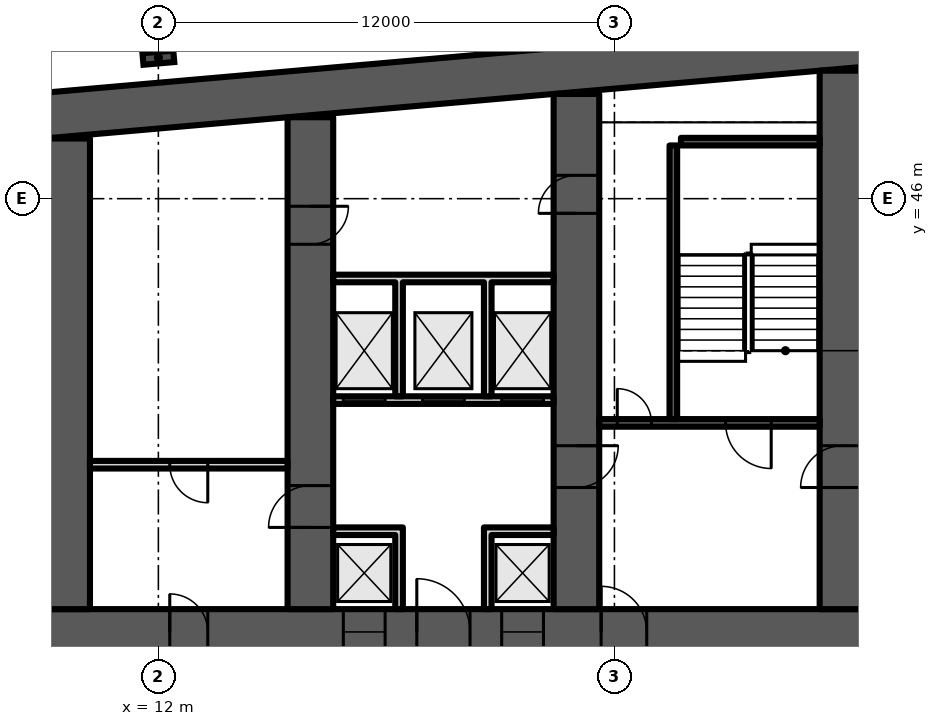
"""IFC4 building model, lengths in metres.
Left out: names, types, materials, properties, quantities, classifications, styles, units other than length and angle.
Written with IfcOpenShell. Run it as: python <this file> out.ifc"""

import sys

from ifc_helpers import new_model, si_unit, direction, frame, frame_2d, origin, origin_2d, place, context, subcontext, project, spatial, polyline, rectangle, i_section, outline, extrude, element, fill, save


model = new_model("IFC4")
c1 = context("Model", 3, precision=1e-05, world=origin(), true_north=direction((0.0, 1.0)))
c2 = subcontext(c1, "Body", "Model", "MODEL_VIEW")
j1 = project(units=[si_unit("LENGTHUNIT", "METRE"), si_unit("PLANEANGLEUNIT", "RADIAN")], contexts=[c1])
p1 = place(None, origin())
s1 = spatial("IfcSite", under=j1, at=p1, CompositionType="ELEMENT")
p2 = place(p1, origin())
s2 = spatial("IfcBuilding", under=s1, at=p2, CompositionType="ELEMENT")
p3 = place(p2, frame((0.0, 0.0, 48.7)))
s3 = spatial("IfcBuildingStorey", under=s2, at=p3, CompositionType="ELEMENT", Elevation=48.7)
p4 = place(p3, origin())
e1 = element("IfcWall", 1, at=p4, inside=s3, PredefinedType="SHEAR", context=c2, shape_type="SweptSolid", body=[
    extrude(outline(polyline([(9.0, 47.583), (37.0, 50.032), (65.0, 47.583), (65.0, 48.787), (37.0, 51.237), (9.0, 48.787), (9.0, 47.583)])), origin(), (0.0, 0.0, 1.0), 3.6),
])
p5 = place(p3, frame((9.0, 34.6, 0.0), z_axis=(0.0, 0.0, 1.0), x_axis=(1.0, 0.0, 0.0)))
e2 = element("IfcWall", 2, at=p5, inside=s3, PredefinedType="SHEAR", context=c2, shape_type="SweptSolid", body=[
    extrude(rectangle(XDim=56.0, YDim=1.2, at=frame_2d((28.0, 0.0))), origin(), (0.0, 0.0, 1.0), 3.6),
])
p6 = place(p5, frame((3.3, 0.0, 0.0)))
e3 = element("IfcOpeningElement", 3, at=p6, cuts=e2, PredefinedType="OPENING", context=c2, shape_type="SweptSolid", body=[
    extrude(rectangle(XDim=1.0, YDim=2.1, at=frame_2d((0.5, 1.05))), frame((0.0, 0.61, 0.0), z_axis=(0.0, -1.0, 0.0), x_axis=(1.0, 0.0, 0.0)), (0.0, 0.0, 1.0), 1.22),
])
p7 = place(p5, frame((7.867, 0.0, 0.0)))
e4 = element("IfcOpeningElement", 4, at=p7, cuts=e2, PredefinedType="OPENING", context=c2, shape_type="SweptSolid", body=[
    extrude(rectangle(XDim=1.1, YDim=2.1, at=frame_2d((0.55, 1.05))), frame((0.0, 0.61, 0.0), z_axis=(0.0, -1.0, 0.0), x_axis=(1.0, 0.0, 0.0)), (0.0, 0.0, 1.0), 1.22),
])
p8 = place(p5, frame((12.033, 0.0, 0.0)))
e5 = element("IfcOpeningElement", 5, at=p8, cuts=e2, PredefinedType="OPENING", context=c2, shape_type="SweptSolid", body=[
    extrude(rectangle(XDim=1.1, YDim=2.1, at=frame_2d((0.55, 1.05))), frame((0.0, 0.61, 0.0), z_axis=(0.0, -1.0, 0.0), x_axis=(1.0, 0.0, 0.0)), (0.0, 0.0, 1.0), 1.22),
])
p9 = place(p5, frame((9.8, 0.0, 0.0)))
e6 = element("IfcOpeningElement", 6, at=p9, cuts=e2, PredefinedType="OPENING", context=c2, shape_type="SweptSolid", body=[
    extrude(rectangle(XDim=1.4, YDim=2.1, at=frame_2d((0.7, 1.05))), frame((0.0, 0.61, 0.0), z_axis=(0.0, -1.0, 0.0), x_axis=(1.0, 0.0, 0.0)), (0.0, 0.0, 1.0), 1.22),
])
p10 = place(p5, frame((14.65, 0.0, 0.0)))
e7 = element("IfcOpeningElement", 7, at=p10, cuts=e2, PredefinedType="OPENING", context=c2, shape_type="SweptSolid", body=[
    extrude(rectangle(XDim=1.2, YDim=2.1, at=frame_2d((0.6, 1.05))), frame((0.0, 0.61, 0.0), z_axis=(0.0, -1.0, 0.0), x_axis=(1.0, 0.0, 0.0)), (0.0, 0.0, 1.0), 1.22),
])
p11 = place(p5, frame((21.867, 0.0, 0.0)))
e8 = element("IfcOpeningElement", 8, at=p11, cuts=e2, PredefinedType="OPENING", context=c2, shape_type="SweptSolid", body=[
    extrude(rectangle(XDim=1.1, YDim=2.1, at=frame_2d((0.55, 1.05))), frame((0.0, 0.61, 0.0), z_axis=(0.0, -1.0, 0.0), x_axis=(1.0, 0.0, 0.0)), (0.0, 0.0, 1.0), 1.22),
])
p12 = place(p5, frame((26.033, 0.0, 0.0)))
e9 = element("IfcOpeningElement", 9, at=p12, cuts=e2, PredefinedType="OPENING", context=c2, shape_type="SweptSolid", body=[
    extrude(rectangle(XDim=1.1, YDim=2.1, at=frame_2d((0.55, 1.05))), frame((0.0, 0.61, 0.0), z_axis=(0.0, -1.0, 0.0), x_axis=(1.0, 0.0, 0.0)), (0.0, 0.0, 1.0), 1.22),
])
p13 = place(p5, frame((23.8, 0.0, 0.0)))
e10 = element("IfcOpeningElement", 10, at=p13, cuts=e2, PredefinedType="OPENING", context=c2, shape_type="SweptSolid", body=[
    extrude(rectangle(XDim=1.4, YDim=2.1, at=frame_2d((0.7, 1.05))), frame((0.0, 0.61, 0.0), z_axis=(0.0, -1.0, 0.0), x_axis=(1.0, 0.0, 0.0)), (0.0, 0.0, 1.0), 1.22),
])
p14 = place(p5, frame((28.867, 0.0, 0.0)))
e11 = element("IfcOpeningElement", 11, at=p14, cuts=e2, PredefinedType="OPENING", context=c2, shape_type="SweptSolid", body=[
    extrude(rectangle(XDim=1.1, YDim=2.1, at=frame_2d((0.55, 1.05))), frame((0.0, 0.61, 0.0), z_axis=(0.0, -1.0, 0.0), x_axis=(1.0, 0.0, 0.0)), (0.0, 0.0, 1.0), 1.22),
])
p15 = place(p5, frame((33.033, 0.0, 0.0)))
e12 = element("IfcOpeningElement", 12, at=p15, cuts=e2, PredefinedType="OPENING", context=c2, shape_type="SweptSolid", body=[
    extrude(rectangle(XDim=1.1, YDim=2.1, at=frame_2d((0.55, 1.05))), frame((0.0, 0.61, 0.0), z_axis=(0.0, -1.0, 0.0), x_axis=(1.0, 0.0, 0.0)), (0.0, 0.0, 1.0), 1.22),
])
p16 = place(p5, frame((40.15, 0.0, 0.0)))
e13 = element("IfcOpeningElement", 13, at=p16, cuts=e2, PredefinedType="OPENING", context=c2, shape_type="SweptSolid", body=[
    extrude(rectangle(XDim=1.2, YDim=2.1, at=frame_2d((0.6, 1.05))), frame((0.0, 0.61, 0.0), z_axis=(0.0, -1.0, 0.0), x_axis=(1.0, 0.0, 0.0)), (0.0, 0.0, 1.0), 1.22),
])
p17 = place(p5, frame((44.8, 0.0, 0.0)))
e14 = element("IfcOpeningElement", 14, at=p17, cuts=e2, PredefinedType="OPENING", context=c2, shape_type="SweptSolid", body=[
    extrude(rectangle(XDim=1.4, YDim=2.1, at=frame_2d((0.7, 1.05))), frame((0.0, 0.61, 0.0), z_axis=(0.0, -1.0, 0.0), x_axis=(1.0, 0.0, 0.0)), (0.0, 0.0, 1.0), 1.22),
])
p18 = place(p5, frame((49.867, 0.0, 0.0)))
e15 = element("IfcOpeningElement", 15, at=p18, cuts=e2, PredefinedType="OPENING", context=c2, shape_type="SweptSolid", body=[
    extrude(rectangle(XDim=1.1, YDim=2.1, at=frame_2d((0.55, 1.05))), frame((0.0, 0.61, 0.0), z_axis=(0.0, -1.0, 0.0), x_axis=(1.0, 0.0, 0.0)), (0.0, 0.0, 1.0), 1.22),
])
p19 = place(p5, frame((53.5, 0.0, 0.0)))
e16 = element("IfcOpeningElement", 16, at=p19, cuts=e2, PredefinedType="OPENING", context=c2, shape_type="SweptSolid", body=[
    extrude(rectangle(XDim=1.1, YDim=2.1, at=frame_2d((0.55, 1.05))), frame((0.0, 0.61, 0.0), z_axis=(0.0, -1.0, 0.0), x_axis=(1.0, 0.0, 0.0)), (0.0, 0.0, 1.0), 1.22),
])
p20 = place(p5, frame((51.567, 0.0, 0.0)))
e17 = element("IfcOpeningElement", 17, at=p20, cuts=e2, PredefinedType="OPENING", context=c2, shape_type="SweptSolid", body=[
    extrude(rectangle(XDim=1.4, YDim=2.1, at=frame_2d((0.7, 1.05))), frame((0.0, 0.61, 0.0), z_axis=(0.0, -1.0, 0.0), x_axis=(1.0, 0.0, 0.0)), (0.0, 0.0, 1.0), 1.22),
])
p21 = place(p3, frame((9.6, 35.2, 0.0), z_axis=(0.0, 0.0, 1.0), x_axis=(0.0, 1.0, 0.0)))
e18 = element("IfcWall", 18, at=p21, inside=s3, PredefinedType="SHEAR", context=c2, shape_type="SweptSolid", body=[
    extrude(rectangle(XDim=12.383, YDim=1.2, at=frame_2d((6.191, 0.0))), origin(), (0.0, 0.0, 1.0), 3.6),
])
p22 = place(p3, frame((16.0, 35.2, 0.0), z_axis=(0.0, 0.0, 1.0), x_axis=(0.0, 1.0, 0.0)))
e19 = element("IfcWall", 19, at=p22, inside=s3, PredefinedType="SHEAR", context=c2, shape_type="SweptSolid", body=[
    extrude(rectangle(XDim=12.943, YDim=1.2, at=frame_2d((6.471, 0.0))), origin(), (0.0, 0.0, 1.0), 3.6),
])
p23 = place(p22, frame((2.15, 0.0, 0.0)))
e20 = element("IfcOpeningElement", 20, at=p23, cuts=e19, PredefinedType="OPENING", context=c2, shape_type="SweptSolid", body=[
    extrude(rectangle(XDim=1.1, YDim=2.1, at=frame_2d((0.55, 1.05))), frame((0.0, 0.61, 0.0), z_axis=(0.0, -1.0, 0.0), x_axis=(1.0, 0.0, 0.0)), (0.0, 0.0, 1.0), 1.22),
])
p24 = place(p22, frame((9.6, 0.0, 0.0)))
e21 = element("IfcOpeningElement", 21, at=p24, cuts=e19, PredefinedType="OPENING", context=c2, shape_type="SweptSolid", body=[
    extrude(rectangle(XDim=1.0, YDim=2.1, at=frame_2d((0.5, 1.05))), frame((0.0, 0.61, 0.0), z_axis=(0.0, -1.0, 0.0), x_axis=(1.0, 0.0, 0.0)), (0.0, 0.0, 1.0), 1.22),
])
p25 = place(p3, frame((23.0, 35.2, 0.0), z_axis=(0.0, 0.0, 1.0), x_axis=(0.0, 1.0, 0.0)))
e22 = element("IfcWall", 22, at=p25, inside=s3, PredefinedType="SHEAR", context=c2, shape_type="SweptSolid", body=[
    extrude(rectangle(XDim=13.555, YDim=1.2, at=frame_2d((6.778, 0.0))), origin(), (0.0, 0.0, 1.0), 3.6),
])
p26 = place(p25, frame((10.414, 0.0, 0.0)))
e23 = element("IfcOpeningElement", 23, at=p26, cuts=e22, PredefinedType="OPENING", context=c2, shape_type="SweptSolid", body=[
    extrude(rectangle(XDim=1.0, YDim=2.1, at=frame_2d((0.5, 1.05))), frame((0.0, 0.61, 0.0), z_axis=(0.0, -1.0, 0.0), x_axis=(1.0, 0.0, 0.0)), (0.0, 0.0, 1.0), 1.22),
])
p27 = place(p25, frame((3.2, 0.0, 0.0)))
e24 = element("IfcOpeningElement", 24, at=p27, cuts=e22, PredefinedType="OPENING", context=c2, shape_type="SweptSolid", body=[
    extrude(rectangle(XDim=1.1, YDim=2.1, at=frame_2d((0.55, 1.05))), frame((0.0, 0.61, 0.0), z_axis=(0.0, -1.0, 0.0), x_axis=(1.0, 0.0, 0.0)), (0.0, 0.0, 1.0), 1.22),
])
p28 = place(p3, frame((30.0, 35.2, 0.0), z_axis=(0.0, 0.0, 1.0), x_axis=(0.0, 1.0, 0.0)))
e25 = element("IfcWall", 25, at=p28, inside=s3, PredefinedType="SHEAR", context=c2, shape_type="SweptSolid", body=[
    extrude(rectangle(XDim=14.168, YDim=1.2, at=frame_2d((7.084, 0.0))), origin(), (0.0, 0.0, 1.0), 3.6),
])
p29 = place(p28, frame((3.2, 0.0, 0.0)))
e26 = element("IfcOpeningElement", 26, at=p29, cuts=e25, PredefinedType="OPENING", context=c2, shape_type="SweptSolid", body=[
    extrude(rectangle(XDim=1.1, YDim=2.1, at=frame_2d((0.55, 1.05))), frame((0.0, 0.61, 0.0), z_axis=(0.0, -1.0, 0.0), x_axis=(1.0, 0.0, 0.0)), (0.0, 0.0, 1.0), 1.22),
])
p30 = place(p3, frame((12.0, 49.71, 0.0), z_axis=(0.0, 0.0, 1.0), x_axis=(-0.087156, 0.996197, 0.0)))
e27 = element("IfcColumn", 27, at=p30, inside=s3, PredefinedType="COLUMN", context=c2, shape_type="SweptSolid", body=[
    extrude(i_section(OverallWidth=0.303, OverallDepth=0.814, WebThickness=0.021, FlangeThickness=0.04, FilletRadius=0.03, at=origin_2d()), origin(), (0.0, 0.0, 1.0), 3.6),
])
p31 = place(p3, frame((10.2, 39.0, 0.0), z_axis=(0.0, 0.0, 1.0), x_axis=(1.0, 0.0, 0.0)))
e28 = element("IfcWall", 28, at=p31, inside=s3, PredefinedType="PARTITIONING", context=c2, shape_type="SweptSolid", body=[
    extrude(rectangle(XDim=5.2, YDim=0.2, at=frame_2d((2.6, 0.0))), origin(), (0.0, 0.0, 1.0), 3.2),
])
p32 = place(p31, frame((2.1, 0.0, 0.0)))
e29 = element("IfcOpeningElement", 29, at=p32, cuts=e28, PredefinedType="OPENING", context=c2, shape_type="SweptSolid", body=[
    extrude(rectangle(XDim=1.0, YDim=2.1, at=frame_2d((0.5, 1.05))), frame((0.0, 0.11, 0.0), z_axis=(0.0, -1.0, 0.0), x_axis=(1.0, 0.0, 0.0)), (0.0, 0.0, 1.0), 0.22),
])
p33 = place(p3, frame((16.6, 40.7, 0.0), z_axis=(0.0, 0.0, 1.0), x_axis=(1.0, 0.0, 0.0)))
e30 = element("IfcWall", 30, at=p33, inside=s3, PredefinedType="PARTITIONING", context=c2, shape_type="SweptSolid", body=[
    extrude(rectangle(XDim=5.8, YDim=0.2, at=frame_2d((2.9, 0.0))), origin(), (0.0, 0.0, 1.0), 3.2),
])
p34 = place(p33, frame((0.267, 0.0, 0.0)))
e31 = element("IfcOpeningElement", 31, at=p34, cuts=e30, PredefinedType="OPENING", context=c2, shape_type="SweptSolid", body=[
    extrude(rectangle(XDim=1.1, YDim=2.1, at=frame_2d((0.55, 1.05))), frame((0.0, 0.11, 0.0), z_axis=(0.0, -1.0, 0.0), x_axis=(1.0, 0.0, 0.0)), (0.0, 0.0, 1.0), 0.22),
])
p35 = place(p33, frame((2.35, 0.0, 0.0)))
e32 = element("IfcOpeningElement", 32, at=p35, cuts=e30, PredefinedType="OPENING", context=c2, shape_type="SweptSolid", body=[
    extrude(rectangle(XDim=1.1, YDim=2.1, at=frame_2d((0.55, 1.05))), frame((0.0, 0.11, 0.0), z_axis=(0.0, -1.0, 0.0), x_axis=(1.0, 0.0, 0.0)), (0.0, 0.0, 1.0), 0.22),
])
p36 = place(p33, frame((4.433, 0.0, 0.0)))
e33 = element("IfcOpeningElement", 33, at=p36, cuts=e30, PredefinedType="OPENING", context=c2, shape_type="SweptSolid", body=[
    extrude(rectangle(XDim=1.1, YDim=2.1, at=frame_2d((0.55, 1.05))), frame((0.0, 0.11, 0.0), z_axis=(0.0, -1.0, 0.0), x_axis=(1.0, 0.0, 0.0)), (0.0, 0.0, 1.0), 0.22),
])
p37 = place(p3, frame((0.0, 0.0, -0.0)))
e34 = element("IfcWall", 34, at=p37, inside=s3, PredefinedType="PARTITIONING", context=c2, shape_type="SweptSolid", body=[
    extrude(outline(polyline([(18.233, 37.15), (16.6, 37.15), (16.6, 37.35), (18.233, 37.35), (18.433, 37.35), (18.433, 35.2), (18.233, 35.2), (18.233, 37.15)])), origin(), (0.0, 0.0, 1.0), 3.2),
])
p38 = place(p3, frame((0.0, 0.0, -0.0)))
e35 = element("IfcWall", 35, at=p38, inside=s3, PredefinedType="PARTITIONING", context=c2, shape_type="SweptSolid", body=[
    extrude(outline(polyline([(20.567, 37.35), (20.767, 37.35), (22.4, 37.35), (22.4, 37.15), (20.767, 37.15), (20.767, 35.2), (20.567, 35.2), (20.567, 37.35)])), origin(), (0.0, 0.0, 1.0), 3.2),
])
p39 = place(p3, frame((0.0, 0.0, -0.0)))
e36 = element("IfcWall", 36, at=p39, inside=s3, PredefinedType="PARTITIONING", context=c2, shape_type="SweptSolid", body=[
    extrude(outline(polyline([(18.433, 40.8), (18.233, 40.8), (18.233, 43.8), (16.6, 43.8), (16.6, 44.0), (22.4, 44.0), (22.4, 43.8), (20.767, 43.8), (20.767, 40.8), (20.567, 40.8), (20.567, 43.8), (18.433, 43.8), (18.433, 40.8)])), origin(), (0.0, 0.0, 1.0), 3.2),
])
p40 = place(p3, frame((23.6, 40.1, 0.0), z_axis=(0.0, 0.0, 1.0), x_axis=(1.0, 0.0, 0.0)))
e37 = element("IfcWall", 37, at=p40, inside=s3, PredefinedType="SHEAR", context=c2, shape_type="SweptSolid", body=[
    extrude(rectangle(XDim=5.8, YDim=0.2, at=frame_2d((2.9, 0.0))), origin(), (0.0, 0.0, 1.0), 3.2),
])
p41 = place(p40, frame((3.325, 0.0, 0.0)))
e38 = element("IfcOpeningElement", 38, at=p41, cuts=e37, PredefinedType="OPENING", context=c2, shape_type="SweptSolid", body=[
    extrude(rectangle(XDim=1.2, YDim=2.1, at=frame_2d((0.6, 1.05))), frame((0.0, 0.11, 0.0), z_axis=(0.0, -1.0, 0.0), x_axis=(1.0, 0.0, 0.0)), (0.0, 0.0, 1.0), 0.22),
])
p42 = place(p40, frame((0.475, 0.0, 0.0)))
e39 = element("IfcOpeningElement", 39, at=p42, cuts=e37, PredefinedType="OPENING", context=c2, shape_type="SweptSolid", body=[
    extrude(rectangle(XDim=0.9, YDim=2.1, at=frame_2d((0.45, 1.05))), frame((0.0, 0.11, 0.0), z_axis=(0.0, -1.0, 0.0), x_axis=(1.0, 0.0, 0.0)), (0.0, 0.0, 1.0), 0.22),
])
p43 = place(p3, frame((25.55, 40.2, 0.0), z_axis=(0.0, 0.0, 1.0), x_axis=(0.0, 1.0, 0.0)))
e40 = element("IfcWall", 40, at=p43, inside=s3, PredefinedType="SHEAR", context=c2, shape_type="SweptSolid", body=[
    extrude(rectangle(XDim=7.2, YDim=0.2, at=frame_2d((3.6, 0.0))), origin(), (0.0, 0.0, 1.0), 3.2),
])
p44 = place(p3, frame((25.75, 47.5, 0.0), z_axis=(0.0, 0.0, 1.0), x_axis=(1.0, 0.0, 0.0)))
e41 = element("IfcWall", 41, at=p44, inside=s3, PredefinedType="SHEAR", context=c2, shape_type="SweptSolid", body=[
    extrude(rectangle(XDim=3.65, YDim=0.2, at=frame_2d((1.825, 0.0))), origin(), (0.0, 0.0, 1.0), 3.2),
])
p45 = place(p6, origin())
e42 = element("IfcDoor", 42, at=p45, inside=s3, OperationType="SINGLE_SWING_LEFT", PredefinedType="DOOR", context=c2, shape_type="SweptSolid", body=[
    extrude(rectangle(XDim=1.0, YDim=2.1, at=frame_2d((0.5, 1.05))), frame((0.0, 0.6, 0.0), z_axis=(0.0, -1.0, 0.0), x_axis=(1.0, 0.0, 0.0)), (0.0, 0.0, 1.0), 1.199),
])
fill(e3, e42)
p46 = place(p32, origin())
e43 = element("IfcDoor", 43, at=p46, inside=s3, OperationType="SINGLE_SWING_RIGHT", PredefinedType="DOOR", context=c2, shape_type="SweptSolid", body=[
    extrude(rectangle(XDim=1.0, YDim=2.1, at=frame_2d((0.5, 1.05))), frame((0.0, 0.025, 0.0), z_axis=(0.0, -1.0, 0.0), x_axis=(1.0, 0.0, 0.0)), (0.0, 0.0, 1.0), 0.05),
])
fill(e29, e43)
p47 = place(p7, origin())
e44 = element("IfcDoor", 44, at=p47, inside=s3, OperationType="DOUBLE_DOOR_SLIDING", PredefinedType="DOOR", context=c2, shape_type="SweptSolid", body=[
    extrude(rectangle(XDim=1.1, YDim=2.1, at=frame_2d((0.55, 1.05))), frame((0.0, 0.025, 0.0), z_axis=(0.0, -1.0, 0.0), x_axis=(1.0, 0.0, 0.0)), (0.0, 0.0, 1.0), 0.05),
])
fill(e4, e44)
p48 = place(p8, origin())
e45 = element("IfcDoor", 45, at=p48, inside=s3, OperationType="DOUBLE_DOOR_SLIDING", PredefinedType="DOOR", context=c2, shape_type="SweptSolid", body=[
    extrude(rectangle(XDim=1.1, YDim=2.1, at=frame_2d((0.55, 1.05))), frame((0.0, 0.025, 0.0), z_axis=(0.0, -1.0, 0.0), x_axis=(1.0, 0.0, 0.0)), (0.0, 0.0, 1.0), 0.05),
])
fill(e5, e45)
p49 = place(p9, origin())
e46 = element("IfcDoor", 46, at=p49, inside=s3, OperationType="DOUBLE_DOOR_SINGLE_SWING", PredefinedType="DOOR", context=c2, shape_type="SweptSolid", body=[
    extrude(rectangle(XDim=1.4, YDim=2.1, at=frame_2d((0.7, 1.05))), frame((0.0, 0.025, 0.0), z_axis=(0.0, -1.0, 0.0), x_axis=(1.0, 0.0, 0.0)), (0.0, 0.0, 1.0), 0.05),
])
fill(e6, e46)
p50 = place(p34, origin())
e47 = element("IfcDoor", 47, at=p50, inside=s3, OperationType="DOUBLE_DOOR_SLIDING", PredefinedType="DOOR", context=c2, shape_type="SweptSolid", body=[
    extrude(rectangle(XDim=1.1, YDim=2.1, at=frame_2d((0.55, 1.05))), frame((0.0, 0.025, 0.0), z_axis=(0.0, -1.0, 0.0), x_axis=(1.0, 0.0, 0.0)), (0.0, 0.0, 1.0), 0.05),
])
fill(e31, e47)
p51 = place(p35, origin())
e48 = element("IfcDoor", 48, at=p51, inside=s3, OperationType="DOUBLE_DOOR_SLIDING", PredefinedType="DOOR", context=c2, shape_type="SweptSolid", body=[
    extrude(rectangle(XDim=1.1, YDim=2.1, at=frame_2d((0.55, 1.05))), frame((0.0, 0.025, 0.0), z_axis=(0.0, -1.0, 0.0), x_axis=(1.0, 0.0, 0.0)), (0.0, 0.0, 1.0), 0.05),
])
fill(e32, e48)
p52 = place(p36, origin())
e49 = element("IfcDoor", 49, at=p52, inside=s3, OperationType="DOUBLE_DOOR_SLIDING", PredefinedType="DOOR", context=c2, shape_type="SweptSolid", body=[
    extrude(rectangle(XDim=1.1, YDim=2.1, at=frame_2d((0.55, 1.05))), frame((0.0, 0.025, 0.0), z_axis=(0.0, -1.0, 0.0), x_axis=(1.0, 0.0, 0.0)), (0.0, 0.0, 1.0), 0.05),
])
fill(e33, e49)
p53 = place(p26, origin())
e50 = element("IfcDoor", 50, at=p53, inside=s3, OperationType="SINGLE_SWING_LEFT", PredefinedType="DOOR", context=c2, shape_type="SweptSolid", body=[
    extrude(rectangle(XDim=1.0, YDim=2.1, at=frame_2d((0.5, 1.05))), frame((0.0, 0.6, 0.0), z_axis=(0.0, -1.0, 0.0), x_axis=(1.0, 0.0, 0.0)), (0.0, 0.0, 1.0), 1.199),
])
fill(e23, e50)
p54 = place(p41, origin())
e51 = element("IfcDoor", 51, at=p54, inside=s3, OperationType="SINGLE_SWING_RIGHT", PredefinedType="DOOR", context=c2, shape_type="SweptSolid", body=[
    extrude(rectangle(XDim=1.2, YDim=2.1, at=frame_2d((0.6, 1.05))), frame((0.0, 0.025, 0.0), z_axis=(0.0, -1.0, 0.0), x_axis=(1.0, 0.0, 0.0)), (0.0, 0.0, 1.0), 0.05),
])
fill(e38, e51)
p55 = place(p42, origin())
e52 = element("IfcDoor", 52, at=p55, inside=s3, OperationType="SINGLE_SWING_LEFT", PredefinedType="DOOR", context=c2, shape_type="SweptSolid", body=[
    extrude(rectangle(XDim=0.9, YDim=2.1, at=frame_2d((0.45, 1.05))), frame((0.0, 0.025, 0.0), z_axis=(0.0, -1.0, 0.0), x_axis=(1.0, 0.0, 0.0)), (0.0, 0.0, 1.0), 0.05),
])
fill(e39, e52)
p56 = place(p10, origin())
e53 = element("IfcDoor", 53, at=p56, inside=s3, OperationType="SINGLE_SWING_LEFT", PredefinedType="DOOR", context=c2, shape_type="SweptSolid", body=[
    extrude(rectangle(XDim=1.2, YDim=2.1, at=frame_2d((0.6, 1.05))), frame((0.0, 0.025, 0.0), z_axis=(0.0, -1.0, 0.0), x_axis=(1.0, 0.0, 0.0)), (0.0, 0.0, 1.0), 0.05),
])
fill(e7, e53)
p57 = place(p23, origin())
e54 = element("IfcDoor", 54, at=p57, inside=s3, OperationType="SINGLE_SWING_LEFT", PredefinedType="DOOR", context=c2, shape_type="SweptSolid", body=[
    extrude(rectangle(XDim=1.1, YDim=2.1, at=frame_2d((0.55, 1.05))), frame((0.0, 0.025, 0.0), z_axis=(0.0, -1.0, 0.0), x_axis=(1.0, 0.0, 0.0)), (0.0, 0.0, 1.0), 0.05),
])
fill(e20, e54)
p58 = place(p24, origin())
e55 = element("IfcDoor", 55, at=p58, inside=s3, OperationType="SINGLE_SWING_RIGHT", PredefinedType="DOOR", context=c2, shape_type="SweptSolid", body=[
    extrude(rectangle(XDim=1.0, YDim=2.1, at=frame_2d((0.5, 1.05))), frame((0.0, 0.6, 0.0), z_axis=(0.0, -1.0, 0.0), x_axis=(1.0, 0.0, 0.0)), (0.0, 0.0, 1.0), 1.199),
])
fill(e21, e55)
p59 = place(p27, origin())
e56 = element("IfcDoor", 56, at=p59, inside=s3, OperationType="SINGLE_SWING_RIGHT", PredefinedType="DOOR", context=c2, shape_type="SweptSolid", body=[
    extrude(rectangle(XDim=1.1, YDim=2.1, at=frame_2d((0.55, 1.05))), frame((0.0, 0.025, 0.0), z_axis=(0.0, -1.0, 0.0), x_axis=(1.0, 0.0, 0.0)), (0.0, 0.0, 1.0), 0.05),
])
fill(e24, e56)
p60 = place(p29, origin())
e57 = element("IfcDoor", 57, at=p60, inside=s3, OperationType="SINGLE_SWING_LEFT", PredefinedType="DOOR", context=c2, shape_type="SweptSolid", body=[
    extrude(rectangle(XDim=1.1, YDim=2.1, at=frame_2d((0.55, 1.05))), frame((0.0, 0.025, 0.0), z_axis=(0.0, -1.0, 0.0), x_axis=(1.0, 0.0, 0.0)), (0.0, 0.0, 1.0), 0.05),
])
fill(e26, e57)
save(model, sys.argv[1])
